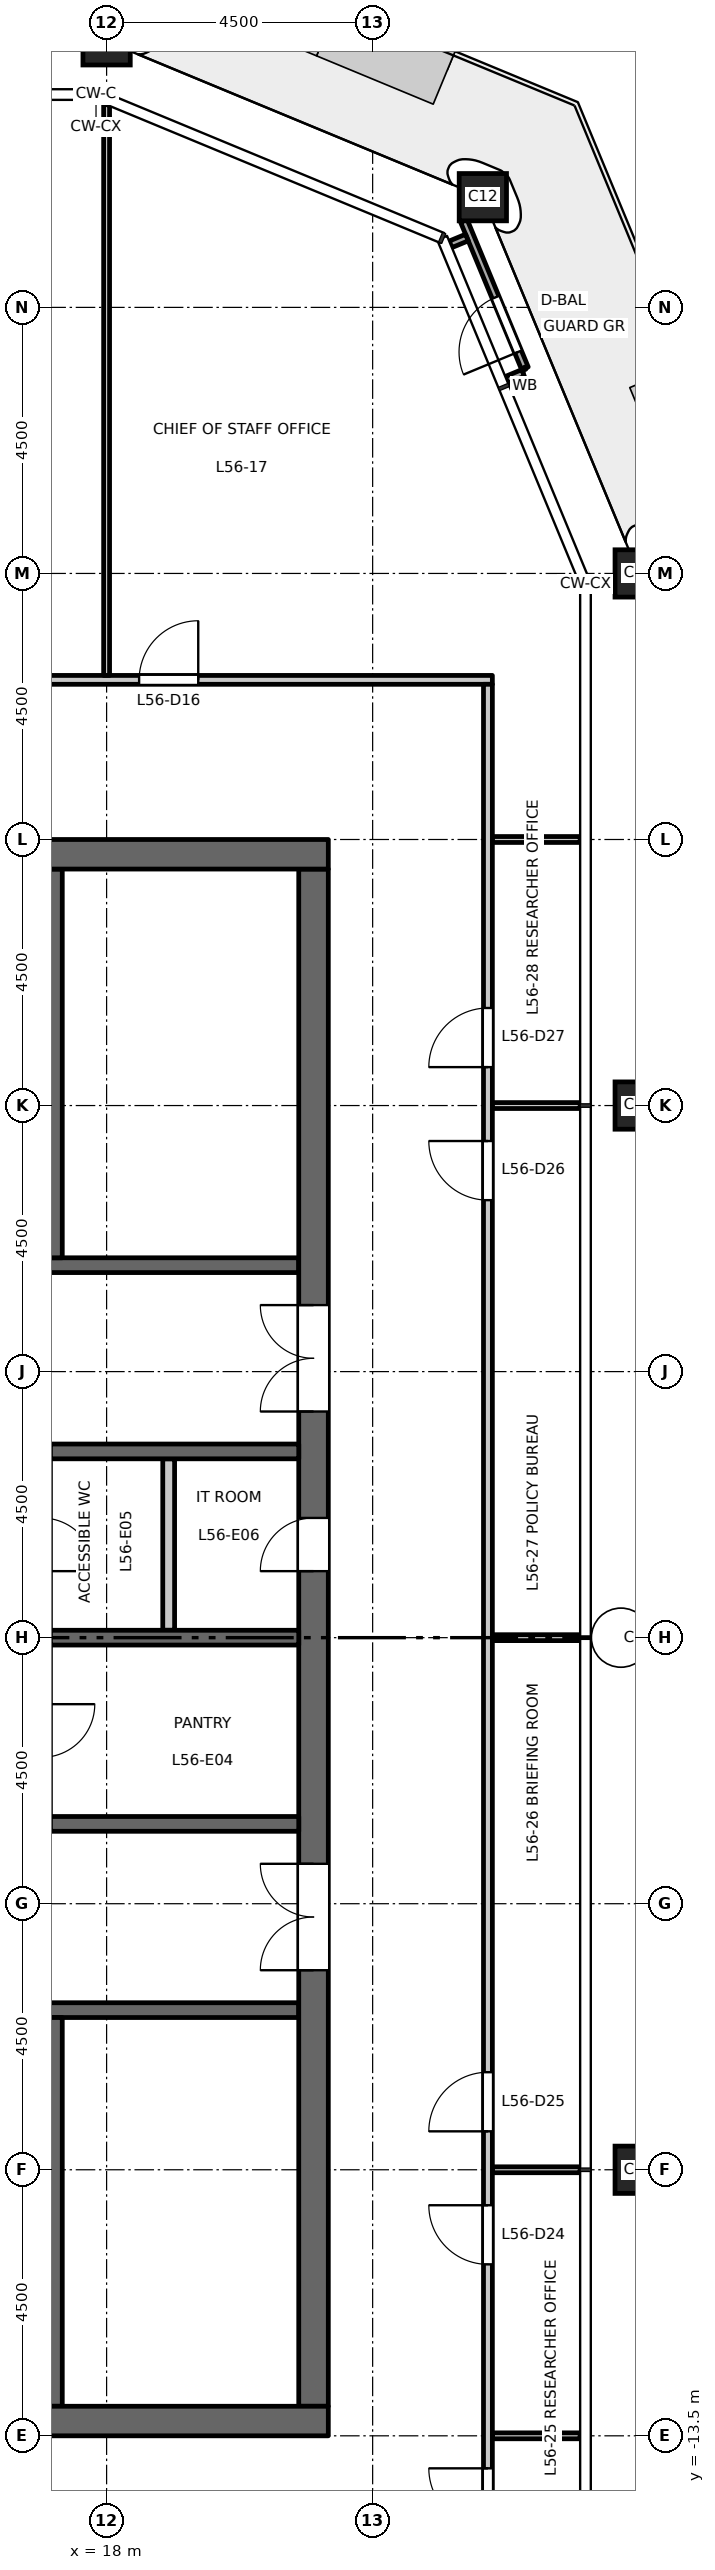
"""IFC4 building model, lengths in metres.
Left out: names, types, materials, properties, quantities, classifications, styles, units other than length and angle.
Written with IfcOpenShell. Run it as: python <this file> out.ifc"""

import sys

from ifc_helpers import new_model, si_unit, direction, frame, frame_2d, origin, origin_2d, place, context, subcontext, project, spatial, rectangle, hollow_rectangle, extrude, element, fill, save


model = new_model("IFC4")
c1 = context("Model", 3, precision=1e-05, world=origin(), true_north=direction((0.0, 1.0)))
c2 = subcontext(c1, "Body", "Model", "MODEL_VIEW")
j1 = project(units=[si_unit("LENGTHUNIT", "METRE"), si_unit("PLANEANGLEUNIT", "RADIAN")], contexts=[c1])
p1 = place(None, origin())
s1 = spatial("IfcSite", under=j1, at=p1, CompositionType="ELEMENT")
p2 = place(p1, origin())
s2 = spatial("IfcBuilding", under=s1, at=p2, CompositionType="ELEMENT")
p3 = place(p2, frame((0.0, 0.0, 260.2)))
s3 = spatial("IfcBuildingStorey", under=s2, at=p3, CompositionType="ELEMENT", Elevation=260.2)
for number, where, z_axis, x_axis in (
    (1, (27.0, -9.0, 0.0), (0.0, 0.0, 1.0), (1.0, 0.0, 0.0)),
    (2, (27.0, 0.0, 0.0), (0.0, 0.0, 1.0), (1.0, 0.0, 0.0)),
    (3, (27.0, 9.0, 0.0), (0.0, 0.0, 1.0), (1.0, 0.0, 0.0)),
    (4, (27.0, 18.0, 0.0), (0.0, 0.0, 1.0), (1.0, 0.0, 0.0)),
    (5, (24.364, 24.364, 0.0), (0.0, 0.0, 1.0), (1.0, 0.0, 0.0)),
    (6, (18.0, 27.0, 0.0), (0.0, 0.0, 1.0), (1.0, 0.0, 0.0)),
):
    element("IfcColumn", number, at=place(p3, frame(where, z_axis=z_axis, x_axis=x_axis)), inside=s3, PredefinedType="COLUMN", context=c2, shape_type="SweptSolid", body=[
        extrude(hollow_rectangle(XDim=0.8, YDim=0.8, WallThickness=0.045, at=origin_2d()), origin(), (0.0, 0.0, 1.0), 4.5),
    ])
p4 = place(p3, frame((17.0, 6.3, 0.0), z_axis=(0.0, 0.0, 1.0), x_axis=(1.0, 0.0, 0.0)))
e7 = element("IfcWall", 7, at=p4, inside=s3, PredefinedType="SHEAR", context=c2, shape_type="SweptSolid", body=[
    extrude(rectangle(XDim=4.25, YDim=0.25, at=frame_2d((2.125, 0.0))), origin(), (0.0, 0.0, 1.0), 4.35),
])
p5 = place(p3, frame((12.15, -6.3, 0.0), z_axis=(0.0, 0.0, 1.0), x_axis=(1.0, 0.0, 0.0)))
e8 = element("IfcWall", 8, at=p5, inside=s3, PredefinedType="SHEAR", context=c2, shape_type="SweptSolid", body=[
    extrude(rectangle(XDim=9.1, YDim=0.25, at=frame_2d((4.55, 0.0))), origin(), (0.0, 0.0, 1.0), 4.35),
])
p6 = place(p5, frame((1.8, 0.0, 0.0)))
e9 = element("IfcOpeningElement", 9, at=p6, cuts=e8, PredefinedType="OPENING", context=c2, shape_type="SweptSolid", body=[
    extrude(rectangle(XDim=1.0, YDim=2.1, at=frame_2d((0.5, 1.05))), frame((0.0, 0.135, 0.0), z_axis=(0.0, -1.0, 0.0), x_axis=(1.0, 0.0, 0.0)), (0.0, 0.0, 1.0), 0.27),
])
p7 = place(p3, frame((21.5, -13.0, 0.0), z_axis=(0.0, 0.0, 1.0), x_axis=(0.0, 1.0, 0.0)))
e10 = element("IfcWall", 10, at=p7, inside=s3, PredefinedType="SHEAR", context=c2, shape_type="SweptSolid", body=[
    extrude(rectangle(XDim=26.0, YDim=0.5, at=frame_2d((13.0, 0.0))), origin(), (0.0, 0.0, 1.0), 4.35),
])
p8 = place(p7, frame((16.825, 0.0, 0.0)))
e11 = element("IfcOpeningElement", 11, at=p8, cuts=e10, PredefinedType="OPENING", context=c2, shape_type="SweptSolid", body=[
    extrude(rectangle(XDim=1.8, YDim=2.1, at=frame_2d((0.9, 1.05))), frame((0.0, 0.26, 0.0), z_axis=(0.0, -1.0, 0.0), x_axis=(1.0, 0.0, 0.0)), (0.0, 0.0, 1.0), 0.52),
])
p9 = place(p7, frame((7.375, 0.0, 0.0)))
e12 = element("IfcOpeningElement", 12, at=p9, cuts=e10, PredefinedType="OPENING", context=c2, shape_type="SweptSolid", body=[
    extrude(rectangle(XDim=1.8, YDim=2.1, at=frame_2d((0.9, 1.05))), frame((0.0, 0.26, 0.0), z_axis=(0.0, -1.0, 0.0), x_axis=(1.0, 0.0, 0.0)), (0.0, 0.0, 1.0), 0.52),
])
p10 = place(p7, frame((14.125, 0.0, 0.0)))
e13 = element("IfcOpeningElement", 13, at=p10, cuts=e10, PredefinedType="OPENING", context=c2, shape_type="SweptSolid", body=[
    extrude(rectangle(XDim=0.9, YDim=2.1, at=frame_2d((0.45, 1.05))), frame((0.0, 0.26, 0.0), z_axis=(0.0, -1.0, 0.0), x_axis=(1.0, 0.0, 0.0)), (0.0, 0.0, 1.0), 0.52),
])
for number, where, z_axis, x_axis in (
    (14, (17.05, 0.0, 0.0), (0.0, 0.0, 1.0), (1.0, 0.0, 0.0)),
    (15, (17.05, 3.15, 0.0), (0.0, 0.0, 1.0), (1.0, 0.0, 0.0)),
    (16, (17.05, -3.15, 0.0), (0.0, 0.0, 1.0), (1.0, 0.0, 0.0)),
):
    element("IfcWall", number, at=place(p3, frame(where, z_axis=z_axis, x_axis=x_axis)), inside=s3, PredefinedType="SHEAR", context=c2, shape_type="SweptSolid", body=[
        extrude(rectangle(XDim=4.2, YDim=0.25, at=frame_2d((2.1, 0.0))), origin(), (0.0, 0.0, 1.0), 4.35),
    ])
p11 = place(p3, frame((19.05, 0.125, 0.0), z_axis=(0.0, 0.0, 1.0), x_axis=(0.0, 1.0, 0.0)))
e17 = element("IfcWall", 17, at=p11, inside=s3, PredefinedType="PARTITIONING", context=c2, shape_type="SweptSolid", body=[
    extrude(rectangle(XDim=2.9, YDim=0.2, at=frame_2d((1.45, 0.0))), origin(), (0.0, 0.0, 1.0), 4.35),
])
for number, where, z_axis, x_axis in (
    (18, (17.0, 6.425, 0.0), (0.0, 0.0, 1.0), (0.0, 1.0, 0.0)),
    (19, (17.0, -13.0, 0.0), (0.0, 0.0, 1.0), (0.0, 1.0, 0.0)),
):
    element("IfcWall", number, at=place(p3, frame(where, z_axis=z_axis, x_axis=x_axis)), inside=s3, PredefinedType="SHEAR", context=c2, shape_type="SweptSolid", body=[
        extrude(rectangle(XDim=6.575, YDim=0.5, at=frame_2d((3.288, 0.0))), origin(), (0.0, 0.0, 1.0), 4.35),
    ])
for number, where, z_axis, x_axis in (
    (20, (8.25, 13.25, 0.0), (0.0, 0.0, 1.0), (1.0, 0.0, 0.0)),
    (21, (8.25, -13.25, 0.0), (0.0, 0.0, 1.0), (1.0, 0.0, 0.0)),
):
    element("IfcWall", number, at=place(p3, frame(where, z_axis=z_axis, x_axis=x_axis)), inside=s3, PredefinedType="SHEAR", context=c2, shape_type="SweptSolid", body=[
        extrude(rectangle(XDim=13.5, YDim=0.5, at=frame_2d((6.75, 0.0))), origin(), (0.0, 0.0, 1.0), 4.35),
    ])
p12 = place(p3, frame((24.766, 21.276, 0.0), z_axis=(0.0, 0.0, 1.0), x_axis=(0.923917630863, 0.382591441855, 0.0)))
e22 = element("IfcWall", 22, at=p12, inside=s3, PredefinedType="STANDARD", context=c2, shape_type="SweptSolid", body=[
    extrude(rectangle(XDim=0.3, YDim=0.12, at=frame_2d((0.15, 0.0))), origin(), (0.0, 0.0, 1.0), 4.35),
])
p13 = place(p3, frame((23.818, 23.566, 0.0), z_axis=(0.0, 0.0, 1.0), x_axis=(0.923629715641, 0.383285987724, 0.0)))
e23 = element("IfcWall", 23, at=p13, inside=s3, PredefinedType="STANDARD", context=c2, shape_type="SweptSolid", body=[
    extrude(rectangle(XDim=0.3, YDim=0.12, at=frame_2d((0.15, 0.0))), origin(), (0.0, 0.0, 1.0), 4.35),
])
p14 = place(p3, frame((25.076, 21.469, 0.0), z_axis=(0.0, 0.0, 1.0), x_axis=(-0.382695131424, 0.923874686516, 0.0)))
e24 = element("IfcWall", 24, at=p14, inside=s3, PredefinedType="STANDARD", context=c2, shape_type="SweptSolid", body=[
    extrude(rectangle(XDim=2.7, YDim=0.12, at=frame_2d((1.35, 0.0))), origin(), (0.0, 0.0, 1.0), 4.35),
])
p15 = place(p14, frame((0.3, 0.0, 0.0)))
e25 = element("IfcOpeningElement", 25, at=p15, cuts=e24, PredefinedType="OPENING", context=c2, shape_type="SweptSolid", body=[
    extrude(rectangle(XDim=1.0, YDim=2.4, at=frame_2d((0.5, 1.2))), frame((0.0, 0.07, 0.0), z_axis=(0.0, -1.0, 0.0), x_axis=(1.0, 0.0, 0.0)), (0.0, 0.0, 1.0), 0.14),
])
p16 = place(p3, frame((24.525, -13.5, 0.0), z_axis=(0.0, 0.0, 1.0), x_axis=(1.0, 0.0, 0.0)))
e26 = element("IfcWall", 26, at=p16, inside=s3, PredefinedType="PARTITIONING", context=c2, shape_type="SweptSolid", body=[
    extrude(rectangle(XDim=1.485, YDim=0.1, at=frame_2d((0.743, 0.0))), origin(), (0.0, 0.0, 1.0), 3.95),
])
for number, where, z_axis, x_axis in (
    (27, (24.525, -9.0, 0.0), (0.0, 0.0, 1.0), (1.0, 0.0, 0.0)),
    (28, (24.525, 0.0, 0.0), (0.0, 0.0, 1.0), (1.0, 0.0, 0.0)),
    (29, (24.525, 9.0, 0.0), (0.0, 0.0, 1.0), (1.0, 0.0, 0.0)),
    (30, (24.525, 13.5, 0.0), (0.0, 0.0, 1.0), (1.0, 0.0, 0.0)),
):
    element("IfcWall", number, at=place(p3, frame(where, z_axis=z_axis, x_axis=x_axis)), inside=s3, PredefinedType="PARTITIONING", context=c2, shape_type="SweptSolid", body=[
        extrude(rectangle(XDim=1.485, YDim=0.1, at=frame_2d((0.743, 0.0))), origin(), (0.0, 0.0, 1.0), 4.35),
    ])
p17 = place(p3, frame((-24.525, 16.2, 0.0), z_axis=(0.0, 0.0, 1.0), x_axis=(1.0, 0.0, 0.0)))
e31 = element("IfcWall", 31, at=p17, inside=s3, PredefinedType="PARTITIONING", context=c2, shape_type="SweptSolid", body=[
    extrude(rectangle(XDim=49.05, YDim=0.15, at=frame_2d((24.525, 0.0))), origin(), (0.0, 0.0, 1.0), 4.35),
])
p18 = place(p17, frame((13.875, 0.0, 0.0)))
e32 = element("IfcOpeningElement", 32, at=p18, cuts=e31, PredefinedType="OPENING", context=c2, shape_type="SweptSolid", body=[
    extrude(rectangle(XDim=1.0, YDim=2.1, at=frame_2d((0.5, 1.05))), frame((0.0, 0.085, 0.0), z_axis=(0.0, -1.0, 0.0), x_axis=(1.0, 0.0, 0.0)), (0.0, 0.0, 1.0), 0.17),
])
p19 = place(p17, frame((22.875, 0.0, 0.0)))
e33 = element("IfcOpeningElement", 33, at=p19, cuts=e31, PredefinedType="OPENING", context=c2, shape_type="SweptSolid", body=[
    extrude(rectangle(XDim=1.0, YDim=2.1, at=frame_2d((0.5, 1.05))), frame((0.0, 0.085, 0.0), z_axis=(0.0, -1.0, 0.0), x_axis=(1.0, 0.0, 0.0)), (0.0, 0.0, 1.0), 0.17),
])
p20 = place(p17, frame((31.875, 0.0, 0.0)))
e34 = element("IfcOpeningElement", 34, at=p20, cuts=e31, PredefinedType="OPENING", context=c2, shape_type="SweptSolid", body=[
    extrude(rectangle(XDim=1.0, YDim=2.1, at=frame_2d((0.5, 1.05))), frame((0.0, 0.085, 0.0), z_axis=(0.0, -1.0, 0.0), x_axis=(1.0, 0.0, 0.0)), (0.0, 0.0, 1.0), 0.17),
])
p21 = place(p17, frame((34.125, 0.0, 0.0)))
e35 = element("IfcOpeningElement", 35, at=p21, cuts=e31, PredefinedType="OPENING", context=c2, shape_type="SweptSolid", body=[
    extrude(rectangle(XDim=1.0, YDim=2.1, at=frame_2d((0.5, 1.05))), frame((0.0, 0.085, 0.0), z_axis=(0.0, -1.0, 0.0), x_axis=(1.0, 0.0, 0.0)), (0.0, 0.0, 1.0), 0.17),
])
p22 = place(p17, frame((4.875, 0.0, 0.0)))
e36 = element("IfcOpeningElement", 36, at=p22, cuts=e31, PredefinedType="OPENING", context=c2, shape_type="SweptSolid", body=[
    extrude(rectangle(XDim=1.0, YDim=2.1, at=frame_2d((0.5, 1.05))), frame((0.0, 0.085, 0.0), z_axis=(0.0, -1.0, 0.0), x_axis=(1.0, 0.0, 0.0)), (0.0, 0.0, 1.0), 0.17),
])
p23 = place(p17, frame((43.075, 0.0, 0.0)))
e37 = element("IfcOpeningElement", 37, at=p23, cuts=e31, PredefinedType="OPENING", context=c2, shape_type="SweptSolid", body=[
    extrude(rectangle(XDim=1.0, YDim=2.1, at=frame_2d((0.5, 1.05))), frame((0.0, 0.085, 0.0), z_axis=(0.0, -1.0, 0.0), x_axis=(1.0, 0.0, 0.0)), (0.0, 0.0, 1.0), 0.17),
])
p24 = place(p3, frame((18.0, 16.275, 0.0), z_axis=(0.0, 0.0, 1.0), x_axis=(0.0, 1.0, 0.0)))
e38 = element("IfcWall", 38, at=p24, inside=s3, PredefinedType="PARTITIONING", context=c2, shape_type="SweptSolid", body=[
    extrude(rectangle(XDim=9.653, YDim=0.1, at=frame_2d((4.827, 0.0))), origin(), (0.0, 0.0, 1.0), 3.65),
])
p25 = place(p3, frame((24.45, -16.125, 0.0), z_axis=(0.0, 0.0, 1.0), x_axis=(0.0, 1.0, 0.0)))
e39 = element("IfcWall", 39, at=p25, inside=s3, PredefinedType="PARTITIONING", context=c2, shape_type="SweptSolid", body=[
    extrude(rectangle(XDim=32.25, YDim=0.15, at=frame_2d((16.125, 0.0))), origin(), (0.0, 0.0, 1.0), 4.35),
])
p26 = place(p25, frame((1.075, 0.0, 0.0)))
e40 = element("IfcOpeningElement", 40, at=p26, cuts=e39, PredefinedType="OPENING", context=c2, shape_type="SweptSolid", body=[
    extrude(rectangle(XDim=1.0, YDim=2.1, at=frame_2d((0.5, 1.05))), frame((0.0, 0.085, 0.0), z_axis=(0.0, -1.0, 0.0), x_axis=(1.0, 0.0, 0.0)), (0.0, 0.0, 1.0), 0.17),
])
p27 = place(p25, frame((5.525, 0.0, 0.0)))
e41 = element("IfcOpeningElement", 41, at=p27, cuts=e39, PredefinedType="OPENING", context=c2, shape_type="SweptSolid", body=[
    extrude(rectangle(XDim=1.0, YDim=2.1, at=frame_2d((0.5, 1.05))), frame((0.0, 0.085, 0.0), z_axis=(0.0, -1.0, 0.0), x_axis=(1.0, 0.0, 0.0)), (0.0, 0.0, 1.0), 0.17),
])
p28 = place(p25, frame((7.775, 0.0, 0.0)))
e42 = element("IfcOpeningElement", 42, at=p28, cuts=e39, PredefinedType="OPENING", context=c2, shape_type="SweptSolid", body=[
    extrude(rectangle(XDim=1.0, YDim=2.1, at=frame_2d((0.5, 1.05))), frame((0.0, 0.085, 0.0), z_axis=(0.0, -1.0, 0.0), x_axis=(1.0, 0.0, 0.0)), (0.0, 0.0, 1.0), 0.17),
])
p29 = place(p25, frame((23.525, 0.0, 0.0)))
e43 = element("IfcOpeningElement", 43, at=p29, cuts=e39, PredefinedType="OPENING", context=c2, shape_type="SweptSolid", body=[
    extrude(rectangle(XDim=1.0, YDim=2.1, at=frame_2d((0.5, 1.05))), frame((0.0, 0.085, 0.0), z_axis=(0.0, -1.0, 0.0), x_axis=(1.0, 0.0, 0.0)), (0.0, 0.0, 1.0), 0.17),
])
p30 = place(p25, frame((25.775, 0.0, 0.0)))
e44 = element("IfcOpeningElement", 44, at=p30, cuts=e39, PredefinedType="OPENING", context=c2, shape_type="SweptSolid", body=[
    extrude(rectangle(XDim=1.0, YDim=2.1, at=frame_2d((0.5, 1.05))), frame((0.0, 0.085, 0.0), z_axis=(0.0, -1.0, 0.0), x_axis=(1.0, 0.0, 0.0)), (0.0, 0.0, 1.0), 0.17),
])
p31 = place(p8, origin())
e45 = element("IfcDoor", 45, at=p31, inside=s3, OperationType="DOUBLE_DOOR_DOUBLE_SWING", PredefinedType="DOOR", context=c2, shape_type="SweptSolid", body=[
    extrude(rectangle(XDim=1.8, YDim=2.1, at=frame_2d((0.9, 1.05))), frame((0.0, 0.025, 0.0), z_axis=(0.0, -1.0, 0.0), x_axis=(1.0, 0.0, 0.0)), (0.0, 0.0, 1.0), 0.05),
])
fill(e11, e45)
p32 = place(p9, origin())
e46 = element("IfcDoor", 46, at=p32, inside=s3, OperationType="DOUBLE_DOOR_DOUBLE_SWING", PredefinedType="DOOR", context=c2, shape_type="SweptSolid", body=[
    extrude(rectangle(XDim=1.8, YDim=2.1, at=frame_2d((0.9, 1.05))), frame((0.0, 0.025, 0.0), z_axis=(0.0, -1.0, 0.0), x_axis=(1.0, 0.0, 0.0)), (0.0, 0.0, 1.0), 0.05),
])
fill(e12, e46)
p33 = place(p10, origin())
e47 = element("IfcDoor", 47, at=p33, inside=s3, OperationType="SINGLE_SWING_RIGHT", PredefinedType="DOOR", context=c2, shape_type="SweptSolid", body=[
    extrude(rectangle(XDim=0.9, YDim=2.1, at=frame_2d((0.45, 1.05))), frame((0.0, 0.025, 0.0), z_axis=(0.0, -1.0, 0.0), x_axis=(1.0, 0.0, 0.0)), (0.0, 0.0, 1.0), 0.05),
])
fill(e13, e47)
p34 = place(p15, origin())
e48 = element("IfcDoor", 48, at=p34, inside=s3, OperationType="SINGLE_SWING_LEFT", PredefinedType="DOOR", context=c2, shape_type="SweptSolid", body=[
    extrude(rectangle(XDim=1.0, YDim=2.4, at=frame_2d((0.5, 1.2))), frame((0.0, 0.025, 0.0), z_axis=(0.0, -1.0, 0.0), x_axis=(1.0, 0.0, 0.0)), (0.0, 0.0, 1.0), 0.05),
])
fill(e25, e48)
p35 = place(p23, origin())
e49 = element("IfcDoor", 49, at=p35, inside=s3, OperationType="SINGLE_SWING_RIGHT", PredefinedType="DOOR", context=c2, shape_type="SweptSolid", body=[
    extrude(rectangle(XDim=1.0, YDim=2.1, at=frame_2d((0.5, 1.05))), frame((0.0, 0.025, 0.0), z_axis=(0.0, -1.0, 0.0), x_axis=(1.0, 0.0, 0.0)), (0.0, 0.0, 1.0), 0.05),
])
fill(e37, e49)
p36 = place(p26, origin())
e50 = element("IfcDoor", 50, at=p36, inside=s3, OperationType="SINGLE_SWING_RIGHT", PredefinedType="DOOR", context=c2, shape_type="SweptSolid", body=[
    extrude(rectangle(XDim=1.0, YDim=2.1, at=frame_2d((0.5, 1.05))), frame((0.0, 0.025, 0.0), z_axis=(0.0, -1.0, 0.0), x_axis=(1.0, 0.0, 0.0)), (0.0, 0.0, 1.0), 0.05),
])
fill(e40, e50)
p37 = place(p27, origin())
e51 = element("IfcDoor", 51, at=p37, inside=s3, OperationType="SINGLE_SWING_RIGHT", PredefinedType="DOOR", context=c2, shape_type="SweptSolid", body=[
    extrude(rectangle(XDim=1.0, YDim=2.1, at=frame_2d((0.5, 1.05))), frame((0.0, 0.025, 0.0), z_axis=(0.0, -1.0, 0.0), x_axis=(1.0, 0.0, 0.0)), (0.0, 0.0, 1.0), 0.05),
])
fill(e41, e51)
p38 = place(p28, origin())
e52 = element("IfcDoor", 52, at=p38, inside=s3, OperationType="SINGLE_SWING_LEFT", PredefinedType="DOOR", context=c2, shape_type="SweptSolid", body=[
    extrude(rectangle(XDim=1.0, YDim=2.1, at=frame_2d((0.5, 1.05))), frame((0.0, 0.025, 0.0), z_axis=(0.0, -1.0, 0.0), x_axis=(1.0, 0.0, 0.0)), (0.0, 0.0, 1.0), 0.05),
])
fill(e42, e52)
p39 = place(p29, origin())
e53 = element("IfcDoor", 53, at=p39, inside=s3, OperationType="SINGLE_SWING_RIGHT", PredefinedType="DOOR", context=c2, shape_type="SweptSolid", body=[
    extrude(rectangle(XDim=1.0, YDim=2.1, at=frame_2d((0.5, 1.05))), frame((0.0, 0.025, 0.0), z_axis=(0.0, -1.0, 0.0), x_axis=(1.0, 0.0, 0.0)), (0.0, 0.0, 1.0), 0.05),
])
fill(e43, e53)
p40 = place(p30, origin())
e54 = element("IfcDoor", 54, at=p40, inside=s3, OperationType="SINGLE_SWING_LEFT", PredefinedType="DOOR", context=c2, shape_type="SweptSolid", body=[
    extrude(rectangle(XDim=1.0, YDim=2.1, at=frame_2d((0.5, 1.05))), frame((0.0, 0.025, 0.0), z_axis=(0.0, -1.0, 0.0), x_axis=(1.0, 0.0, 0.0)), (0.0, 0.0, 1.0), 0.05),
])
fill(e44, e54)
save(model, sys.argv[1])
